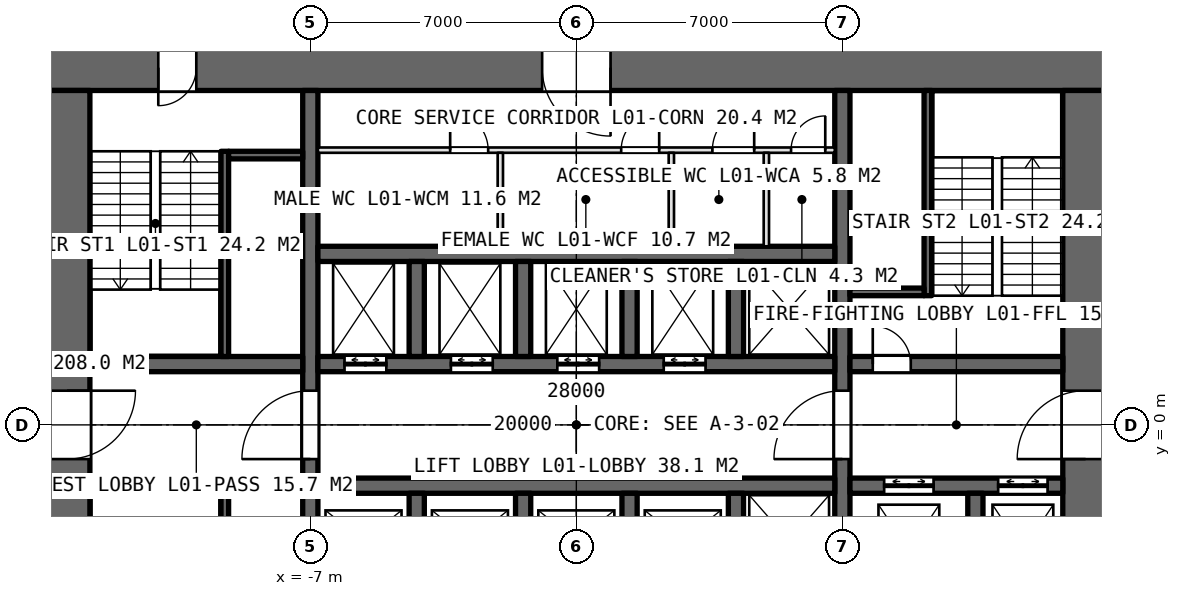
"""IFC4 building model, lengths in metres.
Left out: names, types, materials, properties, quantities, classifications, styles, units other than length and angle.
Written with IfcOpenShell. Run it as: python <this file> out.ifc"""

import sys

from ifc_helpers import new_model, si_unit, direction, frame, frame_2d, origin, place, context, subcontext, project, spatial, rectangle, extrude, element, fill, save


model = new_model("IFC4")
c1 = context("Model", 3, precision=1e-05, world=origin(), true_north=direction((0.0, 1.0)))
c2 = subcontext(c1, "Body", "Model", "MODEL_VIEW")
j1 = project(units=[si_unit("LENGTHUNIT", "METRE"), si_unit("PLANEANGLEUNIT", "RADIAN")], contexts=[c1])
p1 = place(None, origin())
s1 = spatial("IfcSite", under=j1, at=p1, CompositionType="ELEMENT")
p2 = place(p1, origin())
s2 = spatial("IfcBuilding", under=s1, at=p2, CompositionType="ELEMENT")
p3 = place(p2, frame((0.0, 0.0, 5.0)))
s3 = spatial("IfcBuildingStorey", under=s2, at=p3, CompositionType="ELEMENT", Elevation=5.0)
p4 = place(p3, frame((14.0, 9.4, 0.0), z_axis=(0.0, 0.0, 1.0), x_axis=(-1.0, 0.0, 0.0)))
e1 = element("IfcWall", 1, at=p4, inside=s3, PredefinedType="SHEAR", context=c2, shape_type="SweptSolid", body=[
    extrude(rectangle(XDim=28.0, YDim=1.2, at=frame_2d((14.0, 0.0))), origin(), (0.0, 0.0, 1.0), 5.0),
])
p5 = place(p4, frame((24.0, 0.0, 0.0)))
e2 = element("IfcOpeningElement", 2, at=p5, cuts=e1, PredefinedType="OPENING", context=c2, shape_type="SweptSolid", body=[
    extrude(rectangle(XDim=1.0, YDim=2.4, at=frame_2d((0.5, 1.2))), frame((0.0, 0.61, 0.0), z_axis=(0.0, -1.0, 0.0), x_axis=(1.0, 0.0, 0.0)), (0.0, 0.0, 1.0), 1.22),
])
p6 = place(p4, frame((13.1, 0.0, 0.0)))
e3 = element("IfcOpeningElement", 3, at=p6, cuts=e1, PredefinedType="OPENING", context=c2, shape_type="SweptSolid", body=[
    extrude(rectangle(XDim=1.8, YDim=2.4, at=frame_2d((0.9, 1.2))), frame((0.0, 0.61, 0.0), z_axis=(0.0, -1.0, 0.0), x_axis=(1.0, 0.0, 0.0)), (0.0, 0.0, 1.0), 1.22),
])
p7 = place(p3, frame((-13.4, 8.8, 0.0), z_axis=(0.0, 0.0, 1.0), x_axis=(0.0, -1.0, 0.0)))
e4 = element("IfcWall", 4, at=p7, inside=s3, PredefinedType="SHEAR", context=c2, shape_type="SweptSolid", body=[
    extrude(rectangle(XDim=17.6, YDim=1.2, at=frame_2d((8.8, 0.0))), origin(), (0.0, 0.0, 1.0), 5.0),
])
p8 = place(p7, frame((7.9, 0.0, 0.0)))
e5 = element("IfcOpeningElement", 5, at=p8, cuts=e4, PredefinedType="OPENING", context=c2, shape_type="SweptSolid", body=[
    extrude(rectangle(XDim=1.8, YDim=2.4, at=frame_2d((0.9, 1.2))), frame((0.0, 0.61, 0.0), z_axis=(0.0, -1.0, 0.0), x_axis=(1.0, 0.0, 0.0)), (0.0, 0.0, 1.0), 1.22),
])
p9 = place(p7, frame((16.5, 0.0, 0.0)))
e6 = element("IfcOpeningElement", 6, at=p9, cuts=e4, PredefinedType="OPENING", context=c2, shape_type="SweptSolid", body=[
    extrude(rectangle(XDim=1.0, YDim=2.4, at=frame_2d((0.5, 1.2))), frame((0.0, 0.61, 0.0), z_axis=(0.0, -1.0, 0.0), x_axis=(1.0, 0.0, 0.0)), (0.0, 0.0, 1.0), 1.22),
])
p10 = place(p3, frame((13.4, -8.8, 0.0), z_axis=(0.0, 0.0, 1.0), x_axis=(0.0, 1.0, 0.0)))
e7 = element("IfcWall", 7, at=p10, inside=s3, PredefinedType="SHEAR", context=c2, shape_type="SweptSolid", body=[
    extrude(rectangle(XDim=17.6, YDim=1.2, at=frame_2d((8.8, 0.0))), origin(), (0.0, 0.0, 1.0), 5.0),
])
p11 = place(p10, frame((7.9, 0.0, 0.0)))
e8 = element("IfcOpeningElement", 8, at=p11, cuts=e7, PredefinedType="OPENING", context=c2, shape_type="SweptSolid", body=[
    extrude(rectangle(XDim=1.8, YDim=2.4, at=frame_2d((0.9, 1.2))), frame((0.0, 0.61, 0.0), z_axis=(0.0, -1.0, 0.0), x_axis=(1.0, 0.0, 0.0)), (0.0, 0.0, 1.0), 1.22),
])
p12 = place(p3, frame((-7.0, -8.8, 0.0), z_axis=(0.0, 0.0, 1.0), x_axis=(0.0, 1.0, 0.0)))
e9 = element("IfcWall", 9, at=p12, inside=s3, PredefinedType="SHEAR", context=c2, shape_type="SweptSolid", body=[
    extrude(rectangle(XDim=17.6, YDim=0.4, at=frame_2d((8.8, 0.0))), origin(), (0.0, 0.0, 1.0), 5.0),
])
p13 = place(p12, frame((7.9, 0.0, 0.0)))
e10 = element("IfcOpeningElement", 10, at=p13, cuts=e9, PredefinedType="OPENING", context=c2, shape_type="SweptSolid", body=[
    extrude(rectangle(XDim=1.8, YDim=2.4, at=frame_2d((0.9, 1.2))), frame((0.0, 0.21, 0.0), z_axis=(0.0, -1.0, 0.0), x_axis=(1.0, 0.0, 0.0)), (0.0, 0.0, 1.0), 0.42),
])
p14 = place(p3, frame((7.0, -8.8, 0.0), z_axis=(0.0, 0.0, 1.0), x_axis=(0.0, 1.0, 0.0)))
e11 = element("IfcWall", 11, at=p14, inside=s3, PredefinedType="SHEAR", context=c2, shape_type="SweptSolid", body=[
    extrude(rectangle(XDim=17.6, YDim=0.4, at=frame_2d((8.8, 0.0))), origin(), (0.0, 0.0, 1.0), 5.0),
])
p15 = place(p14, frame((7.9, 0.0, 0.0)))
e12 = element("IfcOpeningElement", 12, at=p15, cuts=e11, PredefinedType="OPENING", context=c2, shape_type="SweptSolid", body=[
    extrude(rectangle(XDim=1.8, YDim=2.4, at=frame_2d((0.9, 1.2))), frame((0.0, 0.21, 0.0), z_axis=(0.0, -1.0, 0.0), x_axis=(1.0, 0.0, 0.0)), (0.0, 0.0, 1.0), 0.42),
])
p16 = place(p3, frame((-6.8, 1.6, 0.0), z_axis=(0.0, 0.0, 1.0), x_axis=(1.0, 0.0, 0.0)))
e13 = element("IfcWall", 13, at=p16, inside=s3, PredefinedType="SHEAR", context=c2, shape_type="SweptSolid", body=[
    extrude(rectangle(XDim=13.6, YDim=0.4, at=frame_2d((6.8, 0.0))), origin(), (0.0, 0.0, 1.0), 5.0),
])
p17 = place(p16, frame((0.7, 0.0, 0.0)))
e14 = element("IfcOpeningElement", 14, at=p17, cuts=e13, PredefinedType="OPENING", context=c2, shape_type="SweptSolid", body=[
    extrude(rectangle(XDim=1.1, YDim=2.4, at=frame_2d((0.55, 1.2))), frame((0.0, 0.21, 0.0), z_axis=(0.0, -1.0, 0.0), x_axis=(1.0, 0.0, 0.0)), (0.0, 0.0, 1.0), 0.42),
])
p18 = place(p16, frame((3.5, 0.0, 0.0)))
e15 = element("IfcOpeningElement", 15, at=p18, cuts=e13, PredefinedType="OPENING", context=c2, shape_type="SweptSolid", body=[
    extrude(rectangle(XDim=1.1, YDim=2.4, at=frame_2d((0.55, 1.2))), frame((0.0, 0.21, 0.0), z_axis=(0.0, -1.0, 0.0), x_axis=(1.0, 0.0, 0.0)), (0.0, 0.0, 1.0), 0.42),
])
p19 = place(p16, frame((6.3, 0.0, 0.0)))
e16 = element("IfcOpeningElement", 16, at=p19, cuts=e13, PredefinedType="OPENING", context=c2, shape_type="SweptSolid", body=[
    extrude(rectangle(XDim=1.1, YDim=2.4, at=frame_2d((0.55, 1.2))), frame((0.0, 0.21, 0.0), z_axis=(0.0, -1.0, 0.0), x_axis=(1.0, 0.0, 0.0)), (0.0, 0.0, 1.0), 0.42),
])
p20 = place(p16, frame((9.1, 0.0, 0.0)))
e17 = element("IfcOpeningElement", 17, at=p20, cuts=e13, PredefinedType="OPENING", context=c2, shape_type="SweptSolid", body=[
    extrude(rectangle(XDim=1.1, YDim=2.4, at=frame_2d((0.55, 1.2))), frame((0.0, 0.21, 0.0), z_axis=(0.0, -1.0, 0.0), x_axis=(1.0, 0.0, 0.0)), (0.0, 0.0, 1.0), 0.42),
])
for number, where, z_axis, x_axis in (
    (18, (-6.8, -1.6, 0.0), (0.0, 0.0, 1.0), (1.0, 0.0, 0.0)),
    (19, (-6.8, 4.5, 0.0), (0.0, 0.0, 1.0), (1.0, 0.0, 0.0)),
):
    element("IfcWall", number, at=place(p3, frame(where, z_axis=z_axis, x_axis=x_axis)), inside=s3, PredefinedType="SHEAR", context=c2, shape_type="SweptSolid", body=[
        extrude(rectangle(XDim=13.6, YDim=0.4, at=frame_2d((6.8, 0.0))), origin(), (0.0, 0.0, 1.0), 5.0),
    ])
for number, where, z_axis, x_axis in (
    (20, (-12.8, 1.6, 0.0), (0.0, 0.0, 1.0), (1.0, 0.0, 0.0)),
    (21, (-12.8, -1.6, 0.0), (0.0, 0.0, 1.0), (1.0, 0.0, 0.0)),
):
    element("IfcWall", number, at=place(p3, frame(where, z_axis=z_axis, x_axis=x_axis)), inside=s3, PredefinedType="SHEAR", context=c2, shape_type="SweptSolid", body=[
        extrude(rectangle(XDim=5.6, YDim=0.4, at=frame_2d((2.8, 0.0))), origin(), (0.0, 0.0, 1.0), 5.0),
    ])
p21 = place(p3, frame((7.2, 1.6, 0.0), z_axis=(0.0, 0.0, 1.0), x_axis=(1.0, 0.0, 0.0)))
e22 = element("IfcWall", 22, at=p21, inside=s3, PredefinedType="SHEAR", context=c2, shape_type="SweptSolid", body=[
    extrude(rectangle(XDim=5.6, YDim=0.4, at=frame_2d((2.8, 0.0))), origin(), (0.0, 0.0, 1.0), 5.0),
])
p22 = place(p21, frame((0.6, 0.0, 0.0)))
e23 = element("IfcOpeningElement", 23, at=p22, cuts=e22, PredefinedType="OPENING", context=c2, shape_type="SweptSolid", body=[
    extrude(rectangle(XDim=1.0, YDim=2.4, at=frame_2d((0.5, 1.2))), frame((0.0, 0.21, 0.0), z_axis=(0.0, -1.0, 0.0), x_axis=(1.0, 0.0, 0.0)), (0.0, 0.0, 1.0), 0.42),
])
p23 = place(p3, frame((7.2, -1.6, 0.0), z_axis=(0.0, 0.0, 1.0), x_axis=(1.0, 0.0, 0.0)))
e24 = element("IfcWall", 24, at=p23, inside=s3, PredefinedType="SHEAR", context=c2, shape_type="SweptSolid", body=[
    extrude(rectangle(XDim=5.6, YDim=0.4, at=frame_2d((2.8, 0.0))), origin(), (0.0, 0.0, 1.0), 5.0),
])
p24 = place(p23, frame((0.9, 0.0, 0.0)))
e25 = element("IfcOpeningElement", 25, at=p24, cuts=e24, PredefinedType="OPENING", context=c2, shape_type="SweptSolid", body=[
    extrude(rectangle(XDim=1.3, YDim=2.4, at=frame_2d((0.65, 1.2))), frame((0.0, 0.21, 0.0), z_axis=(0.0, -1.0, 0.0), x_axis=(1.0, 0.0, 0.0)), (0.0, 0.0, 1.0), 0.42),
])
p25 = place(p23, frame((3.9, 0.0, 0.0)))
e26 = element("IfcOpeningElement", 26, at=p25, cuts=e24, PredefinedType="OPENING", context=c2, shape_type="SweptSolid", body=[
    extrude(rectangle(XDim=1.3, YDim=2.4, at=frame_2d((0.65, 1.2))), frame((0.0, 0.21, 0.0), z_axis=(0.0, -1.0, 0.0), x_axis=(1.0, 0.0, 0.0)), (0.0, 0.0, 1.0), 0.42),
])
p26 = place(p3, frame((10.5, -4.8, 0.0), z_axis=(0.0, 0.0, 1.0), x_axis=(0.0, 1.0, 0.0)))
e27 = element("IfcWall", 27, at=p26, inside=s3, PredefinedType="SHEAR", context=c2, shape_type="SweptSolid", body=[
    extrude(rectangle(XDim=3.0, YDim=0.4, at=frame_2d((1.5, 0.0))), origin(), (0.0, 0.0, 1.0), 5.0),
])
for number, where, z_axis, x_axis in (
    (28, (-4.2, 1.8, 0.0), (0.0, 0.0, 1.0), (0.0, 1.0, 0.0)),
    (29, (-4.2, -4.3, 0.0), (0.0, 0.0, 1.0), (0.0, 1.0, 0.0)),
    (30, (-1.4, 1.8, 0.0), (0.0, 0.0, 1.0), (0.0, 1.0, 0.0)),
    (31, (-1.4, -4.3, 0.0), (0.0, 0.0, 1.0), (0.0, 1.0, 0.0)),
    (32, (1.4, 1.8, 0.0), (0.0, 0.0, 1.0), (0.0, 1.0, 0.0)),
    (33, (1.4, -4.3, 0.0), (0.0, 0.0, 1.0), (0.0, 1.0, 0.0)),
    (34, (4.2, 1.8, 0.0), (0.0, 0.0, 1.0), (0.0, 1.0, 0.0)),
    (35, (4.2, -4.3, 0.0), (0.0, 0.0, 1.0), (0.0, 1.0, 0.0)),
):
    element("IfcWall", number, at=place(p3, frame(where, z_axis=z_axis, x_axis=x_axis)), inside=s3, PredefinedType="SHEAR", context=c2, shape_type="SweptSolid", body=[
        extrude(rectangle(XDim=2.5, YDim=0.4, at=frame_2d((1.25, 0.0))), origin(), (0.0, 0.0, 1.0), 5.0),
    ])
p27 = place(p3, frame((-6.8, 7.23, 0.0), z_axis=(0.0, 0.0, 1.0), x_axis=(1.0, 0.0, 0.0)))
e36 = element("IfcWall", 36, at=p27, inside=s3, PredefinedType="PARTITIONING", context=c2, shape_type="SweptSolid", body=[
    extrude(rectangle(XDim=13.6, YDim=0.14, at=frame_2d((6.8, 0.0))), origin(), (0.0, 0.0, 1.0), 4.75),
])
p28 = place(p27, frame((3.48, 0.0, 0.0)))
e37 = element("IfcOpeningElement", 37, at=p28, cuts=e36, PredefinedType="OPENING", context=c2, shape_type="SweptSolid", body=[
    extrude(rectangle(XDim=1.0, YDim=2.4, at=frame_2d((0.5, 1.2))), frame((0.0, 0.08, 0.0), z_axis=(0.0, -1.0, 0.0), x_axis=(1.0, 0.0, 0.0)), (0.0, 0.0, 1.0), 0.16),
])
p29 = place(p27, frame((7.98, 0.0, 0.0)))
e38 = element("IfcOpeningElement", 38, at=p29, cuts=e36, PredefinedType="OPENING", context=c2, shape_type="SweptSolid", body=[
    extrude(rectangle(XDim=1.0, YDim=2.4, at=frame_2d((0.5, 1.2))), frame((0.0, 0.08, 0.0), z_axis=(0.0, -1.0, 0.0), x_axis=(1.0, 0.0, 0.0)), (0.0, 0.0, 1.0), 0.16),
])
p30 = place(p27, frame((10.38, 0.0, 0.0)))
e39 = element("IfcOpeningElement", 39, at=p30, cuts=e36, PredefinedType="OPENING", context=c2, shape_type="SweptSolid", body=[
    extrude(rectangle(XDim=1.1, YDim=2.4, at=frame_2d((0.55, 1.2))), frame((0.0, 0.08, 0.0), z_axis=(0.0, -1.0, 0.0), x_axis=(1.0, 0.0, 0.0)), (0.0, 0.0, 1.0), 0.16),
])
p31 = place(p27, frame((12.45, 0.0, 0.0)))
e40 = element("IfcOpeningElement", 40, at=p31, cuts=e36, PredefinedType="OPENING", context=c2, shape_type="SweptSolid", body=[
    extrude(rectangle(XDim=0.9, YDim=2.4, at=frame_2d((0.45, 1.2))), frame((0.0, 0.08, 0.0), z_axis=(0.0, -1.0, 0.0), x_axis=(1.0, 0.0, 0.0)), (0.0, 0.0, 1.0), 0.16),
])
for number, where, z_axis, x_axis in (
    (41, (-2.0, 4.7, 0.0), (0.0, 0.0, 1.0), (0.0, 1.0, 0.0)),
    (42, (2.5, 4.7, 0.0), (0.0, 0.0, 1.0), (0.0, 1.0, 0.0)),
    (43, (5.0, 4.7, 0.0), (0.0, 0.0, 1.0), (0.0, 1.0, 0.0)),
):
    element("IfcWall", number, at=place(p3, frame(where, z_axis=z_axis, x_axis=x_axis)), inside=s3, PredefinedType="PARTITIONING", context=c2, shape_type="SweptSolid", body=[
        extrude(rectangle(XDim=2.46, YDim=0.14, at=frame_2d((1.23, 0.0))), origin(), (0.0, 0.0, 1.0), 4.75),
    ])
p32 = place(p3, frame((-9.25, 7.2, 0.0), z_axis=(0.0, 0.0, 1.0), x_axis=(0.0, -1.0, 0.0)))
e44 = element("IfcWall", 44, at=p32, inside=s3, PredefinedType="SOLIDWALL", context=c2, shape_type="SweptSolid", body=[
    extrude(rectangle(XDim=5.4, YDim=0.2, at=frame_2d((2.7, 0.0))), origin(), (0.0, 0.0, 1.0), 5.0),
])
p33 = place(p3, frame((-9.15, 7.1, 0.0), z_axis=(0.0, 0.0, 1.0), x_axis=(1.0, 0.0, 0.0)))
e45 = element("IfcWall", 45, at=p33, inside=s3, PredefinedType="SOLIDWALL", context=c2, shape_type="SweptSolid", body=[
    extrude(rectangle(XDim=1.95, YDim=0.2, at=frame_2d((0.975, 0.0))), origin(), (0.0, 0.0, 1.0), 5.0),
])
p34 = place(p3, frame((-9.25, -7.2, 0.0), z_axis=(0.0, 0.0, 1.0), x_axis=(0.0, 1.0, 0.0)))
e46 = element("IfcWall", 46, at=p34, inside=s3, PredefinedType="SOLIDWALL", context=c2, shape_type="SweptSolid", body=[
    extrude(rectangle(XDim=5.4, YDim=0.2, at=frame_2d((2.7, 0.0))), origin(), (0.0, 0.0, 1.0), 5.0),
])
p35 = place(p3, frame((9.25, 3.4, 0.0), z_axis=(0.0, 0.0, 1.0), x_axis=(0.0, 1.0, 0.0)))
e47 = element("IfcWall", 47, at=p35, inside=s3, PredefinedType="SOLIDWALL", context=c2, shape_type="SweptSolid", body=[
    extrude(rectangle(XDim=5.4, YDim=0.2, at=frame_2d((2.7, 0.0))), origin(), (0.0, 0.0, 1.0), 5.0),
])
p36 = place(p3, frame((9.15, 3.5, 0.0), z_axis=(0.0, 0.0, 1.0), x_axis=(-1.0, 0.0, 0.0)))
e48 = element("IfcWall", 48, at=p36, inside=s3, PredefinedType="SOLIDWALL", context=c2, shape_type="SweptSolid", body=[
    extrude(rectangle(XDim=1.95, YDim=0.2, at=frame_2d((0.975, 0.0))), origin(), (0.0, 0.0, 1.0), 5.0),
])
p37 = place(p8, origin())
e49 = element("IfcDoor", 49, at=p37, inside=s3, OperationType="DOUBLE_DOOR_SINGLE_SWING", PredefinedType="DOOR", context=c2, shape_type="SweptSolid", body=[
    extrude(rectangle(XDim=1.8, YDim=2.4, at=frame_2d((0.9, 1.2))), frame((0.0, 0.025, 0.0), z_axis=(0.0, -1.0, 0.0), x_axis=(1.0, 0.0, 0.0)), (0.0, 0.0, 1.0), 0.05),
])
fill(e5, e49)
p38 = place(p11, origin())
e50 = element("IfcDoor", 50, at=p38, inside=s3, OperationType="DOUBLE_DOOR_SINGLE_SWING", PredefinedType="DOOR", context=c2, shape_type="SweptSolid", body=[
    extrude(rectangle(XDim=1.8, YDim=2.4, at=frame_2d((0.9, 1.2))), frame((0.0, 0.025, 0.0), z_axis=(0.0, -1.0, 0.0), x_axis=(1.0, 0.0, 0.0)), (0.0, 0.0, 1.0), 0.05),
])
fill(e8, e50)
p39 = place(p13, origin())
e51 = element("IfcDoor", 51, at=p39, inside=s3, OperationType="DOUBLE_DOOR_SINGLE_SWING", PredefinedType="DOOR", context=c2, shape_type="SweptSolid", body=[
    extrude(rectangle(XDim=1.8, YDim=2.4, at=frame_2d((0.9, 1.2))), frame((0.0, 0.025, 0.0), z_axis=(0.0, -1.0, 0.0), x_axis=(1.0, 0.0, 0.0)), (0.0, 0.0, 1.0), 0.05),
])
fill(e10, e51)
p40 = place(p15, origin())
e52 = element("IfcDoor", 52, at=p40, inside=s3, OperationType="DOUBLE_DOOR_SINGLE_SWING", PredefinedType="DOOR", context=c2, shape_type="SweptSolid", body=[
    extrude(rectangle(XDim=1.8, YDim=2.4, at=frame_2d((0.9, 1.2))), frame((0.0, 0.025, 0.0), z_axis=(0.0, -1.0, 0.0), x_axis=(1.0, 0.0, 0.0)), (0.0, 0.0, 1.0), 0.05),
])
fill(e12, e52)
p41 = place(p5, origin())
e53 = element("IfcDoor", 53, at=p41, inside=s3, OperationType="SINGLE_SWING_RIGHT", PredefinedType="DOOR", context=c2, shape_type="SweptSolid", body=[
    extrude(rectangle(XDim=1.0, YDim=2.4, at=frame_2d((0.5, 1.2))), frame((0.0, 0.025, 0.0), z_axis=(0.0, -1.0, 0.0), x_axis=(1.0, 0.0, 0.0)), (0.0, 0.0, 1.0), 0.05),
])
fill(e2, e53)
p42 = place(p22, origin())
e54 = element("IfcDoor", 54, at=p42, inside=s3, OperationType="SINGLE_SWING_LEFT", PredefinedType="DOOR", context=c2, shape_type="SweptSolid", body=[
    extrude(rectangle(XDim=1.0, YDim=2.4, at=frame_2d((0.5, 1.2))), frame((0.0, 0.025, 0.0), z_axis=(0.0, -1.0, 0.0), x_axis=(1.0, 0.0, 0.0)), (0.0, 0.0, 1.0), 0.05),
])
fill(e23, e54)
p43 = place(p28, origin())
e55 = element("IfcDoor", 55, at=p43, inside=s3, OperationType="SINGLE_SWING_LEFT", PredefinedType="DOOR", context=c2, shape_type="SweptSolid", body=[
    extrude(rectangle(XDim=1.0, YDim=2.4, at=frame_2d((0.5, 1.2))), frame((0.0, 0.025, 0.0), z_axis=(0.0, -1.0, 0.0), x_axis=(1.0, 0.0, 0.0)), (0.0, 0.0, 1.0), 0.05),
])
fill(e37, e55)
p44 = place(p29, origin())
e56 = element("IfcDoor", 56, at=p44, inside=s3, OperationType="SINGLE_SWING_RIGHT", PredefinedType="DOOR", context=c2, shape_type="SweptSolid", body=[
    extrude(rectangle(XDim=1.0, YDim=2.4, at=frame_2d((0.5, 1.2))), frame((0.0, 0.025, 0.0), z_axis=(0.0, -1.0, 0.0), x_axis=(1.0, 0.0, 0.0)), (0.0, 0.0, 1.0), 0.05),
])
fill(e38, e56)
p45 = place(p30, origin())
e57 = element("IfcDoor", 57, at=p45, inside=s3, OperationType="SINGLE_SWING_RIGHT", PredefinedType="DOOR", context=c2, shape_type="SweptSolid", body=[
    extrude(rectangle(XDim=1.1, YDim=2.4, at=frame_2d((0.55, 1.2))), frame((0.0, 0.025, 0.0), z_axis=(0.0, -1.0, 0.0), x_axis=(1.0, 0.0, 0.0)), (0.0, 0.0, 1.0), 0.05),
])
fill(e39, e57)
p46 = place(p31, origin())
e58 = element("IfcDoor", 58, at=p46, inside=s3, OperationType="SINGLE_SWING_RIGHT", PredefinedType="DOOR", context=c2, shape_type="SweptSolid", body=[
    extrude(rectangle(XDim=0.9, YDim=2.4, at=frame_2d((0.45, 1.2))), frame((0.0, 0.025, 0.0), z_axis=(0.0, -1.0, 0.0), x_axis=(1.0, 0.0, 0.0)), (0.0, 0.0, 1.0), 0.05),
])
fill(e40, e58)
p47 = place(p6, origin())
e59 = element("IfcDoor", 59, at=p47, inside=s3, OperationType="DOUBLE_DOOR_SINGLE_SWING", PredefinedType="DOOR", context=c2, shape_type="SweptSolid", body=[
    extrude(rectangle(XDim=1.8, YDim=2.4, at=frame_2d((0.9, 1.2))), frame((0.0, 0.025, 0.0), z_axis=(0.0, -1.0, 0.0), x_axis=(1.0, 0.0, 0.0)), (0.0, 0.0, 1.0), 0.05),
])
fill(e3, e59)
p48 = place(p17, origin())
e60 = element("IfcDoor", 60, at=p48, inside=s3, OperationType="DOUBLE_DOOR_SLIDING", PredefinedType="DOOR", context=c2, shape_type="SweptSolid", body=[
    extrude(rectangle(XDim=1.1, YDim=2.4, at=frame_2d((0.55, 1.2))), frame((0.0, 0.025, 0.0), z_axis=(0.0, -1.0, 0.0), x_axis=(1.0, 0.0, 0.0)), (0.0, 0.0, 1.0), 0.05),
])
fill(e14, e60)
p49 = place(p18, origin())
e61 = element("IfcDoor", 61, at=p49, inside=s3, OperationType="DOUBLE_DOOR_SLIDING", PredefinedType="DOOR", context=c2, shape_type="SweptSolid", body=[
    extrude(rectangle(XDim=1.1, YDim=2.4, at=frame_2d((0.55, 1.2))), frame((0.0, 0.025, 0.0), z_axis=(0.0, -1.0, 0.0), x_axis=(1.0, 0.0, 0.0)), (0.0, 0.0, 1.0), 0.05),
])
fill(e15, e61)
p50 = place(p19, origin())
e62 = element("IfcDoor", 62, at=p50, inside=s3, OperationType="DOUBLE_DOOR_SLIDING", PredefinedType="DOOR", context=c2, shape_type="SweptSolid", body=[
    extrude(rectangle(XDim=1.1, YDim=2.4, at=frame_2d((0.55, 1.2))), frame((0.0, 0.025, 0.0), z_axis=(0.0, -1.0, 0.0), x_axis=(1.0, 0.0, 0.0)), (0.0, 0.0, 1.0), 0.05),
])
fill(e16, e62)
p51 = place(p20, origin())
e63 = element("IfcDoor", 63, at=p51, inside=s3, OperationType="DOUBLE_DOOR_SLIDING", PredefinedType="DOOR", context=c2, shape_type="SweptSolid", body=[
    extrude(rectangle(XDim=1.1, YDim=2.4, at=frame_2d((0.55, 1.2))), frame((0.0, 0.025, 0.0), z_axis=(0.0, -1.0, 0.0), x_axis=(1.0, 0.0, 0.0)), (0.0, 0.0, 1.0), 0.05),
])
fill(e17, e63)
p52 = place(p24, origin())
e64 = element("IfcDoor", 64, at=p52, inside=s3, OperationType="DOUBLE_DOOR_SLIDING", PredefinedType="DOOR", context=c2, shape_type="SweptSolid", body=[
    extrude(rectangle(XDim=1.3, YDim=2.4, at=frame_2d((0.65, 1.2))), frame((0.0, 0.025, 0.0), z_axis=(0.0, -1.0, 0.0), x_axis=(1.0, 0.0, 0.0)), (0.0, 0.0, 1.0), 0.05),
])
fill(e25, e64)
p53 = place(p25, origin())
e65 = element("IfcDoor", 65, at=p53, inside=s3, OperationType="DOUBLE_DOOR_SLIDING", PredefinedType="DOOR", context=c2, shape_type="SweptSolid", body=[
    extrude(rectangle(XDim=1.3, YDim=2.4, at=frame_2d((0.65, 1.2))), frame((0.0, 0.025, 0.0), z_axis=(0.0, -1.0, 0.0), x_axis=(1.0, 0.0, 0.0)), (0.0, 0.0, 1.0), 0.05),
])
fill(e26, e65)
save(model, sys.argv[1])
